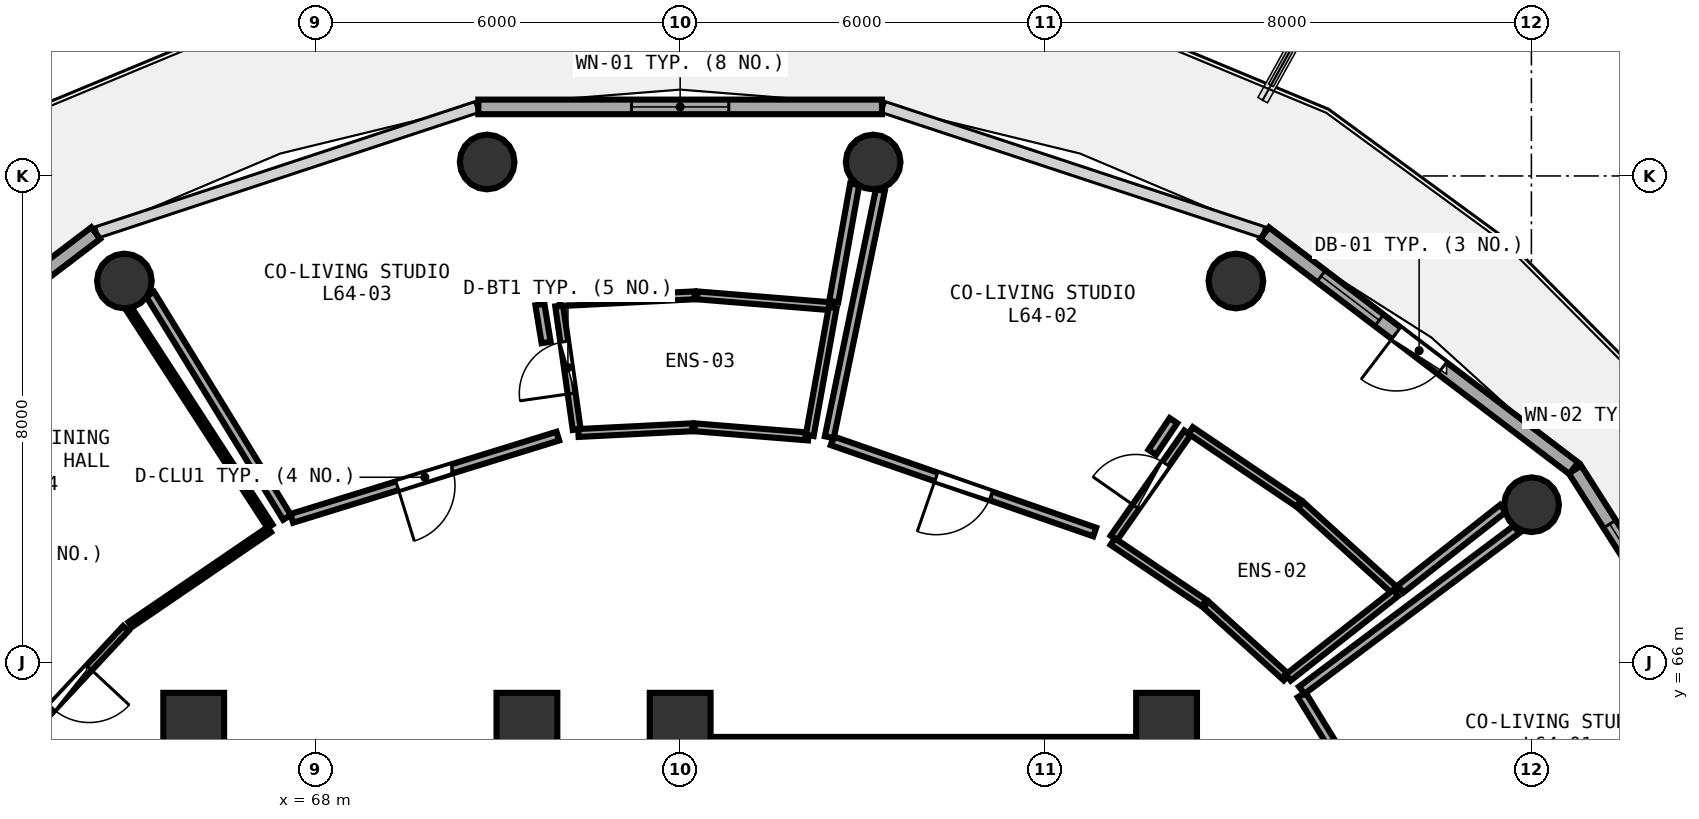
"""IFC4 building model, lengths in metres.
Left out: names, types, materials, properties, quantities, classifications, styles, units other than length and angle.
Written with IfcOpenShell. Run it as: python <this file> out.ifc"""

import sys

from ifc_helpers import new_model, si_unit, direction, frame, frame_2d, origin, origin_2d, place, context, subcontext, project, spatial, rectangle, circle, extrude, element, fill, save


model = new_model("IFC4")
c1 = context("Model", 3, precision=1e-05, world=origin(), true_north=direction((0.0, 1.0)))
c2 = subcontext(c1, "Body", "Model", "MODEL_VIEW")
j1 = project(units=[si_unit("LENGTHUNIT", "METRE"), si_unit("PLANEANGLEUNIT", "RADIAN")], contexts=[c1])
p1 = place(None, origin())
s1 = spatial("IfcSite", under=j1, at=p1, CompositionType="ELEMENT")
p2 = place(p1, origin())
s2 = spatial("IfcBuilding", under=s1, at=p2, CompositionType="ELEMENT")
p3 = place(p2, frame((0.0, 0.0, 252.45)))
s3 = spatial("IfcBuildingStorey", under=s2, at=p3, CompositionType="ELEMENT", Elevation=252.45)
for number, where, z_axis, x_axis in (
    (1, (82.0, 65.0, 0.0), (0.0, 0.0, 1.0), (1.0, 0.0, 0.0)),
    (2, (74.0, 65.0, 0.0), (0.0, 0.0, 1.0), (1.0, 0.0, 0.0)),
    (3, (71.48, 65.0, 0.0), (0.0, 0.0, 1.0), (1.0, 0.0, 0.0)),
    (4, (66.0, 65.0, 0.0), (0.0, 0.0, 1.0), (1.0, 0.0, 0.0)),
):
    element("IfcColumn", number, at=place(p3, frame(where, z_axis=z_axis, x_axis=x_axis)), inside=s3, PredefinedType="PILASTER", context=c2, shape_type="SweptSolid", body=[
        extrude(rectangle(XDim=1.0, YDim=1.0, at=origin_2d()), origin(), (0.0, 0.0, 1.0), 3.75),
    ])
for number, where, z_axis, x_axis in (
    (5, (88.003, 68.593, 0.0), (0.0, 0.0, 1.0), (1.0, 0.0, 0.0)),
    (6, (83.14, 72.272, 0.0), (0.0, 0.0, 1.0), (1.0, 0.0, 0.0)),
    (7, (77.174, 74.229, 0.0), (0.0, 0.0, 1.0), (1.0, 0.0, 0.0)),
    (8, (70.826, 74.229, 0.0), (0.0, 0.0, 1.0), (1.0, 0.0, 0.0)),
    (9, (64.86, 72.272, 0.0), (0.0, 0.0, 1.0), (1.0, 0.0, 0.0)),
):
    element("IfcColumn", number, at=place(p3, frame(where, z_axis=z_axis, x_axis=x_axis)), inside=s3, PredefinedType="COLUMN", context=c2, shape_type="SweptSolid", body=[
        extrude(circle(Radius=0.45, at=origin_2d()), origin(), (0.0, 0.0, 1.0), 3.75),
    ])
p4 = place(p3, frame((92.034, 63.964, 0.0), z_axis=(0.0, 0.0, 1.0), x_axis=(-0.537271968456, 0.843409053728, 0.0)))
e10 = element("IfcWall", 10, at=p4, inside=s3, PredefinedType="SOLIDWALL", context=c2, shape_type="SweptSolid", body=[
    extrude(rectangle(XDim=6.175, YDim=0.24, at=frame_2d((3.087, 0.0))), origin(), (0.0, 0.0, 1.0), 3.475),
])
p5 = place(p4, frame((2.613, 0.0, 0.0)))
e11 = element("IfcOpeningElement", 11, at=p5, cuts=e10, PredefinedType="OPENING", context=c2, shape_type="SweptSolid", body=[
    extrude(rectangle(XDim=0.95, YDim=2.1, at=frame_2d((0.475, 1.05))), frame((0.0, 0.13, 0.0), z_axis=(0.0, -1.0, 0.0), x_axis=(1.0, 0.0, 0.0)), (0.0, 0.0, 1.0), 0.26),
])
p6 = place(p4, frame((3.913, 0.0, 0.85)))
e12 = element("IfcOpeningElement", 12, at=p6, cuts=e10, PredefinedType="OPENING", context=c2, shape_type="SweptSolid", body=[
    extrude(rectangle(XDim=1.2, YDim=1.45, at=frame_2d((0.6, 0.725))), frame((0.0, 0.13, 0.0), z_axis=(0.0, -1.0, 0.0), x_axis=(1.0, 0.0, 0.0)), (0.0, 0.0, 1.0), 0.26),
])
p7 = place(p3, frame((88.696, 69.194, 0.0), z_axis=(0.0, 0.0, 1.0), x_axis=(-0.796010444211, 0.605282886514, 0.0)))
e13 = element("IfcWall", 13, at=p7, inside=s3, PredefinedType="SOLIDWALL", context=c2, shape_type="SweptSolid", body=[
    extrude(rectangle(XDim=6.387, YDim=0.24, at=frame_2d((3.194, 0.0))), origin(), (0.0, 0.0, 1.0), 3.475),
])
p8 = place(p7, frame((2.719, 0.0, 0.0)))
e14 = element("IfcOpeningElement", 14, at=p8, cuts=e13, PredefinedType="OPENING", context=c2, shape_type="SweptSolid", body=[
    extrude(rectangle(XDim=0.95, YDim=2.1, at=frame_2d((0.475, 1.05))), frame((0.0, 0.13, 0.0), z_axis=(0.0, -1.0, 0.0), x_axis=(1.0, 0.0, 0.0)), (0.0, 0.0, 1.0), 0.26),
])
p9 = place(p7, frame((4.019, 0.0, 0.85)))
e15 = element("IfcOpeningElement", 15, at=p9, cuts=e13, PredefinedType="OPENING", context=c2, shape_type="SweptSolid", body=[
    extrude(rectangle(XDim=1.2, YDim=1.45, at=frame_2d((0.6, 0.725))), frame((0.0, 0.13, 0.0), z_axis=(0.0, -1.0, 0.0), x_axis=(1.0, 0.0, 0.0)), (0.0, 0.0, 1.0), 0.26),
])
p10 = place(p3, frame((77.319, 75.136, 0.0), z_axis=(0.0, 0.0, 1.0), x_axis=(-1.0, 0.0, 0.0)))
e16 = element("IfcWall", 16, at=p10, inside=s3, PredefinedType="SOLIDWALL", context=c2, shape_type="SweptSolid", body=[
    extrude(rectangle(XDim=6.638, YDim=0.24, at=frame_2d((3.319, 0.0))), origin(), (0.0, 0.0, 1.0), 3.475),
])
p11 = place(p10, frame((2.519, 0.0, 0.85)))
e17 = element("IfcOpeningElement", 17, at=p11, cuts=e16, PredefinedType="OPENING", context=c2, shape_type="SweptSolid", body=[
    extrude(rectangle(XDim=1.6, YDim=1.45, at=frame_2d((0.8, 0.725))), frame((0.0, 0.13, 0.0), z_axis=(0.0, -1.0, 0.0), x_axis=(1.0, 0.0, 0.0)), (0.0, 0.0, 1.0), 0.26),
])
p12 = place(p3, frame((64.388, 73.06, 0.0), z_axis=(0.0, 0.0, 1.0), x_axis=(-0.796010444211, -0.605282886514, 0.0)))
e18 = element("IfcWall", 18, at=p12, inside=s3, PredefinedType="SOLIDWALL", context=c2, shape_type="SweptSolid", body=[
    extrude(rectangle(XDim=6.387, YDim=0.24, at=frame_2d((3.194, 0.0))), origin(), (0.0, 0.0, 1.0), 3.475),
])
p13 = place(p12, frame((2.394, 0.0, 0.85)))
e19 = element("IfcOpeningElement", 19, at=p13, cuts=e18, PredefinedType="OPENING", context=c2, shape_type="SweptSolid", body=[
    extrude(rectangle(XDim=1.6, YDim=1.45, at=frame_2d((0.8, 0.725))), frame((0.0, 0.13, 0.0), z_axis=(0.0, -1.0, 0.0), x_axis=(1.0, 0.0, 0.0)), (0.0, 0.0, 1.0), 0.26),
])
p14 = place(p3, frame((74.0, 64.6, 0.0), z_axis=(0.0, 0.0, 1.0), x_axis=(1.0, 0.0, 0.0)))
e20 = element("IfcWall", 20, at=p14, inside=s3, PredefinedType="SHEAR", context=c2, shape_type="SweptSolid", body=[
    extrude(rectangle(XDim=8.0, YDim=0.35, at=frame_2d((4.0, 0.0))), origin(), (0.0, 0.0, 1.0), 3.49),
])
p15 = place(p3, frame((86.456, 61.824, 0.0), z_axis=(0.0, 0.0, 1.0), x_axis=(-0.522665227064, 0.852538011128, 0.0)))
e21 = element("IfcWall", 21, at=p15, inside=s3, PredefinedType="PARTITIONING", context=c2, shape_type="SweptSolid", body=[
    extrude(rectangle(XDim=4.273, YDim=0.15, at=frame_2d((2.136, 0.0))), origin(), (0.0, 0.0, 1.0), 3.075),
])
p16 = place(p15, frame((1.661, 0.0, 0.0)))
e22 = element("IfcOpeningElement", 22, at=p16, cuts=e21, PredefinedType="OPENING", context=c2, shape_type="SweptSolid", body=[
    extrude(rectangle(XDim=0.95, YDim=2.08, at=frame_2d((0.475, 1.04))), frame((0.0, 0.085, 0.0), z_axis=(0.0, -1.0, 0.0), x_axis=(1.0, 0.0, 0.0)), (0.0, 0.0, 1.0), 0.17),
])
p17 = place(p3, frame((81.133, 68.047, 0.0), z_axis=(0.0, 0.0, 1.0), x_axis=(0.573578732096, 0.819150436787, 0.0)))
e23 = element("IfcWall", 23, at=p17, inside=s3, PredefinedType="PLUMBINGWALL", context=c2, shape_type="SweptSolid", body=[
    extrude(rectangle(XDim=2.112, YDim=0.13, at=frame_2d((1.056, 0.0))), origin(), (0.0, 0.0, 1.0), 3.175),
])
p18 = place(p17, frame((0.626, 0.0, 0.0)))
e24 = element("IfcOpeningElement", 24, at=p18, cuts=e23, PredefinedType="OPENING", context=c2, shape_type="SweptSolid", body=[
    extrude(rectangle(XDim=0.86, YDim=2.05, at=frame_2d((0.43, 1.025))), frame((0.0, 0.075, 0.0), z_axis=(0.0, -1.0, 0.0), x_axis=(1.0, 0.0, 0.0)), (0.0, 0.0, 1.0), 0.15),
])
p19 = place(p3, frame((80.818, 68.145, 0.0), z_axis=(0.0, 0.0, 1.0), x_axis=(-0.944627899296, 0.328143462331, 0.0)))
e25 = element("IfcWall", 25, at=p19, inside=s3, PredefinedType="PARTITIONING", context=c2, shape_type="SweptSolid", body=[
    extrude(rectangle(XDim=4.57, YDim=0.15, at=frame_2d((2.285, 0.0))), origin(), (0.0, 0.0, 1.0), 3.48),
])
p20 = place(p19, frame((1.81, 0.0, 0.0)))
e26 = element("IfcOpeningElement", 26, at=p20, cuts=e25, PredefinedType="OPENING", context=c2, shape_type="SweptSolid", body=[
    extrude(rectangle(XDim=0.95, YDim=2.08, at=frame_2d((0.475, 1.04))), frame((0.0, 0.085, 0.0), z_axis=(0.0, -1.0, 0.0), x_axis=(1.0, 0.0, 0.0)), (0.0, 0.0, 1.0), 0.17),
])
p21 = place(p3, frame((72.299, 69.831, 0.0), z_axis=(0.0, 0.0, 1.0), x_axis=(-0.14028943716, 0.990110536163, 0.0)))
e27 = element("IfcWall", 27, at=p21, inside=s3, PredefinedType="PLUMBINGWALL", context=c2, shape_type="SweptSolid", body=[
    extrude(rectangle(XDim=2.053, YDim=0.13, at=frame_2d((1.027, 0.0))), origin(), (0.0, 0.0, 1.0), 3.175),
])
p22 = place(p21, frame((0.597, 0.0, 0.0)))
e28 = element("IfcOpeningElement", 28, at=p22, cuts=e27, PredefinedType="OPENING", context=c2, shape_type="SweptSolid", body=[
    extrude(rectangle(XDim=0.86, YDim=2.05, at=frame_2d((0.43, 1.025))), frame((0.0, 0.075, 0.0), z_axis=(0.0, -1.0, 0.0), x_axis=(1.0, 0.0, 0.0)), (0.0, 0.0, 1.0), 0.15),
])
p23 = place(p3, frame((71.989, 69.721, 0.0), z_axis=(0.0, 0.0, 1.0), x_axis=(-0.955414123224, -0.295269119863, 0.0)))
e29 = element("IfcWall", 29, at=p23, inside=s3, PredefinedType="PARTITIONING", context=c2, shape_type="SweptSolid", body=[
    extrude(rectangle(XDim=4.581, YDim=0.15, at=frame_2d((2.291, 0.0))), origin(), (0.0, 0.0, 1.0), 3.075),
])
p24 = place(p23, frame((1.815, 0.0, 0.0)))
e30 = element("IfcOpeningElement", 30, at=p24, cuts=e29, PredefinedType="OPENING", context=c2, shape_type="SweptSolid", body=[
    extrude(rectangle(XDim=0.95, YDim=2.08, at=frame_2d((0.475, 1.04))), frame((0.0, 0.085, 0.0), z_axis=(0.0, -1.0, 0.0), x_axis=(1.0, 0.0, 0.0)), (0.0, 0.0, 1.0), 0.17),
])
p25 = place(p3, frame((64.882, 66.557, 0.0), z_axis=(0.0, 0.0, 1.0), x_axis=(-0.681315269885, -0.731990097625, 0.0)))
e31 = element("IfcWall", 31, at=p25, inside=s3, PredefinedType="PARTITIONING", context=c2, shape_type="SweptSolid", body=[
    extrude(rectangle(XDim=2.664, YDim=0.12, at=frame_2d((1.332, 0.0))), origin(), (0.0, 0.0, 1.0), 3.075),
])
p26 = place(p25, frame((0.882, 0.0, 0.0)))
e32 = element("IfcOpeningElement", 32, at=p26, cuts=e31, PredefinedType="OPENING", context=c2, shape_type="SweptSolid", body=[
    extrude(rectangle(XDim=0.9, YDim=2.08, at=frame_2d((0.45, 1.04))), frame((0.0, 0.07, 0.0), z_axis=(0.0, -1.0, 0.0), x_axis=(1.0, 0.0, 0.0)), (0.0, 0.0, 1.0), 0.14),
])
p27 = place(p3, frame((84.223, 65.542, 0.0), z_axis=(0.0, 0.0, 1.0), x_axis=(0.800384816546, 0.599486568191, 0.0)))
e33 = element("IfcWall", 33, at=p27, inside=s3, PredefinedType="PARTITIONING", context=c2, shape_type="SweptSolid", body=[
    extrude(rectangle(XDim=4.414, YDim=0.15, at=frame_2d((2.207, 0.0))), origin(), (0.0, 0.0, 1.0), 3.175),
])
p28 = place(p3, frame((83.97, 65.753, 0.0), z_axis=(0.0, 0.0, 1.0), x_axis=(-0.741337974143, 0.671131885767, 0.0)))
e34 = element("IfcWall", 34, at=p28, inside=s3, PredefinedType="PLUMBINGWALL", context=c2, shape_type="SweptSolid", body=[
    extrude(rectangle(XDim=1.784, YDim=0.13, at=frame_2d((0.892, 0.0))), origin(), (0.0, 0.0, 1.0), 3.075),
])
p29 = place(p3, frame((82.616, 66.975, 0.0), z_axis=(0.0, 0.0, 1.0), x_axis=(-0.82921750612, 0.558926048367, 0.0)))
e35 = element("IfcWall", 35, at=p29, inside=s3, PredefinedType="PLUMBINGWALL", context=c2, shape_type="SweptSolid", body=[
    extrude(rectangle(XDim=1.81, YDim=0.13, at=frame_2d((0.905, 0.0))), origin(), (0.0, 0.0, 1.0), 3.075),
])
p30 = place(p3, frame((82.396, 69.815, 0.0), z_axis=(0.0, 0.0, 1.0), x_axis=(0.828761584291, -0.559601855254, 0.0)))
e36 = element("IfcWall", 36, at=p30, inside=s3, PredefinedType="PLUMBINGWALL", context=c2, shape_type="SweptSolid", body=[
    extrude(rectangle(XDim=2.145, YDim=0.13, at=frame_2d((1.073, 0.0))), origin(), (0.0, 0.0, 1.0), 3.075),
])
p31 = place(p3, frame((84.205, 68.59, 0.0), z_axis=(0.0, 0.0, 1.0), x_axis=(0.740404918602, -0.672161109043, 0.0)))
e37 = element("IfcWall", 37, at=p31, inside=s3, PredefinedType="PLUMBINGWALL", context=c2, shape_type="SweptSolid", body=[
    extrude(rectangle(XDim=2.114, YDim=0.13, at=frame_2d((1.057, 0.0))), origin(), (0.0, 0.0, 1.0), 3.075),
])
p32 = place(p3, frame((85.769, 67.143, 0.0), z_axis=(0.0, 0.0, 1.0), x_axis=(-0.786197810061, -0.617974921381, 0.0)))
e38 = element("IfcWall", 38, at=p32, inside=s3, PredefinedType="PLUMBINGWALL", context=c2, shape_type="SweptSolid", body=[
    extrude(rectangle(XDim=2.25, YDim=0.13, at=frame_2d((1.125, 0.0))), origin(), (0.0, 0.0, 1.0), 3.075),
])
p33 = place(p3, frame((76.453, 69.703, 0.0), z_axis=(0.0, 0.0, 1.0), x_axis=(0.202308141573, 0.979321916355, 0.0)))
e39 = element("IfcWall", 39, at=p33, inside=s3, PredefinedType="PARTITIONING", context=c2, shape_type="SweptSolid", body=[
    extrude(rectangle(XDim=4.153, YDim=0.15, at=frame_2d((2.076, 0.0))), origin(), (0.0, 0.0, 1.0), 3.175),
])
p34 = place(p3, frame((87.532, 68.533, 0.0), z_axis=(0.0, 0.0, 1.0), x_axis=(-0.785832073147, -0.618439934685, 0.0)))
e40 = element("IfcWall", 40, at=p34, inside=s3, PredefinedType="PARTITIONING", context=c2, shape_type="SweptSolid", body=[
    extrude(rectangle(XDim=2.144, YDim=0.15, at=frame_2d((1.072, 0.0))), origin(), (0.0, 0.0, 1.0), 3.075),
])
p35 = place(p3, frame((82.113, 69.977, 0.0), z_axis=(0.0, 0.0, 1.0), x_axis=(-0.555598996852, -0.831450392204, 0.0)))
e41 = element("IfcWall", 41, at=p35, inside=s3, PredefinedType="PARTITIONING", context=c2, shape_type="SweptSolid", body=[
    extrude(rectangle(XDim=0.627, YDim=0.15, at=frame_2d((0.313, 0.0))), origin(), (0.0, 0.0, 1.0), 3.175),
])
p36 = place(p3, frame((76.108, 69.716, 0.0), z_axis=(0.0, 0.0, 1.0), x_axis=(-0.996754521178, 0.080501083911, 0.0)))
e42 = element("IfcWall", 42, at=p36, inside=s3, PredefinedType="PLUMBINGWALL", context=c2, shape_type="SweptSolid", body=[
    extrude(rectangle(XDim=1.874, YDim=0.13, at=frame_2d((0.937, 0.0))), origin(), (0.0, 0.0, 1.0), 3.075),
])
p37 = place(p3, frame((74.2, 69.867, 0.0), z_axis=(0.0, 0.0, 1.0), x_axis=(-0.998743232436, -0.050119414036, 0.0)))
e43 = element("IfcWall", 43, at=p37, inside=s3, PredefinedType="PLUMBINGWALL", context=c2, shape_type="SweptSolid", body=[
    extrude(rectangle(XDim=1.875, YDim=0.13, at=frame_2d((0.938, 0.0))), origin(), (0.0, 0.0, 1.0), 3.48),
])
p38 = place(p3, frame((72.022, 71.925, 0.0), z_axis=(0.0, 0.0, 1.0), x_axis=(0.998726159472, 0.050458481805, 0.0)))
e44 = element("IfcWall", 44, at=p38, inside=s3, PredefinedType="PLUMBINGWALL", context=c2, shape_type="SweptSolid", body=[
    extrude(rectangle(XDim=2.221, YDim=0.13, at=frame_2d((1.11, 0.0))), origin(), (0.0, 0.0, 1.0), 3.48),
])
p39 = place(p3, frame((74.28, 72.036, 0.0), z_axis=(0.0, 0.0, 1.0), x_axis=(0.996718024019, -0.080951717687, 0.0)))
e45 = element("IfcWall", 45, at=p39, inside=s3, PredefinedType="PLUMBINGWALL", context=c2, shape_type="SweptSolid", body=[
    extrude(rectangle(XDim=2.22, YDim=0.13, at=frame_2d((1.11, 0.0))), origin(), (0.0, 0.0, 1.0), 3.075),
])
p40 = place(p3, frame((76.509, 71.835, 0.0), z_axis=(0.0, 0.0, 1.0), x_axis=(-0.176550443794, -0.984291593379, 0.0)))
e46 = element("IfcWall", 46, at=p40, inside=s3, PredefinedType="PLUMBINGWALL", context=c2, shape_type="SweptSolid", body=[
    extrude(rectangle(XDim=2.135, YDim=0.13, at=frame_2d((1.067, 0.0))), origin(), (0.0, 0.0, 1.0), 3.075),
])
p41 = place(p3, frame((67.534, 68.385, 0.0), z_axis=(0.0, 0.0, 1.0), x_axis=(-0.522784059663, 0.852465147066, 0.0)))
e47 = element("IfcWall", 47, at=p41, inside=s3, PredefinedType="PARTITIONING", context=c2, shape_type="SweptSolid", body=[
    extrude(rectangle(XDim=4.306, YDim=0.15, at=frame_2d((2.153, 0.0))), origin(), (0.0, 0.0, 1.0), 3.175),
])
p42 = place(p3, frame((76.871, 73.864, 0.0), z_axis=(0.0, 0.0, 1.0), x_axis=(-0.176100981623, -0.98437210661, 0.0)))
e48 = element("IfcWall", 48, at=p42, inside=s3, PredefinedType="PARTITIONING", context=c2, shape_type="SweptSolid", body=[
    extrude(rectangle(XDim=1.96, YDim=0.15, at=frame_2d((0.98, 0.0))), origin(), (0.0, 0.0, 1.0), 3.075),
])
p43 = place(p3, frame((71.694, 71.885, 0.0), z_axis=(0.0, 0.0, 1.0), x_axis=(0.162139500997, -0.986767846161, 0.0)))
e49 = element("IfcWall", 49, at=p43, inside=s3, PredefinedType="PARTITIONING", context=c2, shape_type="SweptSolid", body=[
    extrude(rectangle(XDim=0.631, YDim=0.15, at=frame_2d((0.315, 0.0))), origin(), (0.0, 0.0, 1.0), 3.48),
])
p44 = place(p3, frame((67.243, 68.184, 0.0), z_axis=(0.0, 0.0, 1.0), x_axis=(-0.826087380575, -0.563542047814, 0.0)))
e50 = element("IfcWall", 50, at=p44, inside=s3, PredefinedType="PARTITIONING", context=c2, shape_type="SweptSolid", body=[
    extrude(rectangle(XDim=2.768, YDim=0.1, at=frame_2d((1.384, 0.0))), origin(), (0.0, 0.0, 1.0), 3.075),
])
p45 = place(p3, frame((64.942, 71.804, 0.0), z_axis=(0.0, 0.0, 1.0), x_axis=(0.544234825024, -0.838932926539, 0.0)))
e51 = element("IfcWall", 51, at=p45, inside=s3, PredefinedType="PARTITIONING", context=c2, shape_type="SweptSolid", body=[
    extrude(rectangle(XDim=4.249, YDim=0.1, at=frame_2d((2.125, 0.0))), origin(), (0.0, 0.0, 1.0), 3.075),
])
p46 = place(p6, origin())
e52 = element("IfcWindow", 52, at=p46, inside=s3, PartitioningType="SINGLE_PANEL", PredefinedType="WINDOW", context=c2, shape_type="SweptSolid", body=[
    extrude(rectangle(XDim=1.2, YDim=1.45, at=frame_2d((0.6, 0.725))), frame((0.0, 0.03, 0.0), z_axis=(0.0, -1.0, 0.0), x_axis=(1.0, 0.0, 0.0)), (0.0, 0.0, 1.0), 0.06),
])
fill(e12, e52)
p47 = place(p8, frame((0.95, 0.0, 0.0), z_axis=(0.0, 0.0, 1.0), x_axis=(-1.0, 0.0, 0.0)))
e53 = element("IfcDoor", 53, at=p47, inside=s3, OperationType="SINGLE_SWING_LEFT", PredefinedType="DOOR", context=c2, shape_type="SweptSolid", body=[
    extrude(rectangle(XDim=0.95, YDim=2.1, at=frame_2d((0.475, 1.05))), frame((0.0, 0.025, 0.0), z_axis=(0.0, -1.0, 0.0), x_axis=(1.0, 0.0, 0.0)), (0.0, 0.0, 1.0), 0.05),
])
fill(e14, e53)
p48 = place(p9, origin())
e54 = element("IfcWindow", 54, at=p48, inside=s3, PartitioningType="SINGLE_PANEL", PredefinedType="WINDOW", context=c2, shape_type="SweptSolid", body=[
    extrude(rectangle(XDim=1.2, YDim=1.45, at=frame_2d((0.6, 0.725))), frame((0.0, 0.03, 0.0), z_axis=(0.0, -1.0, 0.0), x_axis=(1.0, 0.0, 0.0)), (0.0, 0.0, 1.0), 0.06),
])
fill(e15, e54)
p49 = place(p11, origin())
e55 = element("IfcWindow", 55, at=p49, inside=s3, PartitioningType="SINGLE_PANEL", PredefinedType="WINDOW", context=c2, shape_type="SweptSolid", body=[
    extrude(rectangle(XDim=1.6, YDim=1.45, at=frame_2d((0.8, 0.725))), frame((0.0, 0.03, 0.0), z_axis=(0.0, -1.0, 0.0), x_axis=(1.0, 0.0, 0.0)), (0.0, 0.0, 1.0), 0.06),
])
fill(e17, e55)
p50 = place(p18, origin())
e56 = element("IfcDoor", 56, at=p50, inside=s3, OperationType="SINGLE_SWING_LEFT", PredefinedType="DOOR", context=c2, shape_type="SweptSolid", body=[
    extrude(rectangle(XDim=0.86, YDim=2.05, at=frame_2d((0.43, 1.025))), frame((0.0, 0.025, 0.0), z_axis=(0.0, -1.0, 0.0), x_axis=(1.0, 0.0, 0.0)), (0.0, 0.0, 1.0), 0.05),
])
fill(e24, e56)
p51 = place(p20, origin())
e57 = element("IfcDoor", 57, at=p51, inside=s3, OperationType="SINGLE_SWING_RIGHT", PredefinedType="DOOR", context=c2, shape_type="SweptSolid", body=[
    extrude(rectangle(XDim=0.95, YDim=2.08, at=frame_2d((0.475, 1.04))), frame((0.0, 0.025, 0.0), z_axis=(0.0, -1.0, 0.0), x_axis=(1.0, 0.0, 0.0)), (0.0, 0.0, 1.0), 0.05),
])
fill(e26, e57)
p52 = place(p22, origin())
e58 = element("IfcDoor", 58, at=p52, inside=s3, OperationType="SINGLE_SWING_LEFT", PredefinedType="DOOR", context=c2, shape_type="SweptSolid", body=[
    extrude(rectangle(XDim=0.86, YDim=2.05, at=frame_2d((0.43, 1.025))), frame((0.0, 0.025, 0.0), z_axis=(0.0, -1.0, 0.0), x_axis=(1.0, 0.0, 0.0)), (0.0, 0.0, 1.0), 0.05),
])
fill(e28, e58)
p53 = place(p24, origin())
e59 = element("IfcDoor", 59, at=p53, inside=s3, OperationType="SINGLE_SWING_RIGHT", PredefinedType="DOOR", context=c2, shape_type="SweptSolid", body=[
    extrude(rectangle(XDim=0.95, YDim=2.08, at=frame_2d((0.475, 1.04))), frame((0.0, 0.025, 0.0), z_axis=(0.0, -1.0, 0.0), x_axis=(1.0, 0.0, 0.0)), (0.0, 0.0, 1.0), 0.05),
])
fill(e30, e59)
p54 = place(p26, origin())
e60 = element("IfcDoor", 60, at=p54, inside=s3, OperationType="SINGLE_SWING_LEFT", PredefinedType="DOOR", context=c2, shape_type="SweptSolid", body=[
    extrude(rectangle(XDim=0.9, YDim=2.08, at=frame_2d((0.45, 1.04))), frame((0.0, 0.025, 0.0), z_axis=(0.0, -1.0, 0.0), x_axis=(1.0, 0.0, 0.0)), (0.0, 0.0, 1.0), 0.05),
])
fill(e32, e60)
save(model, sys.argv[1])
